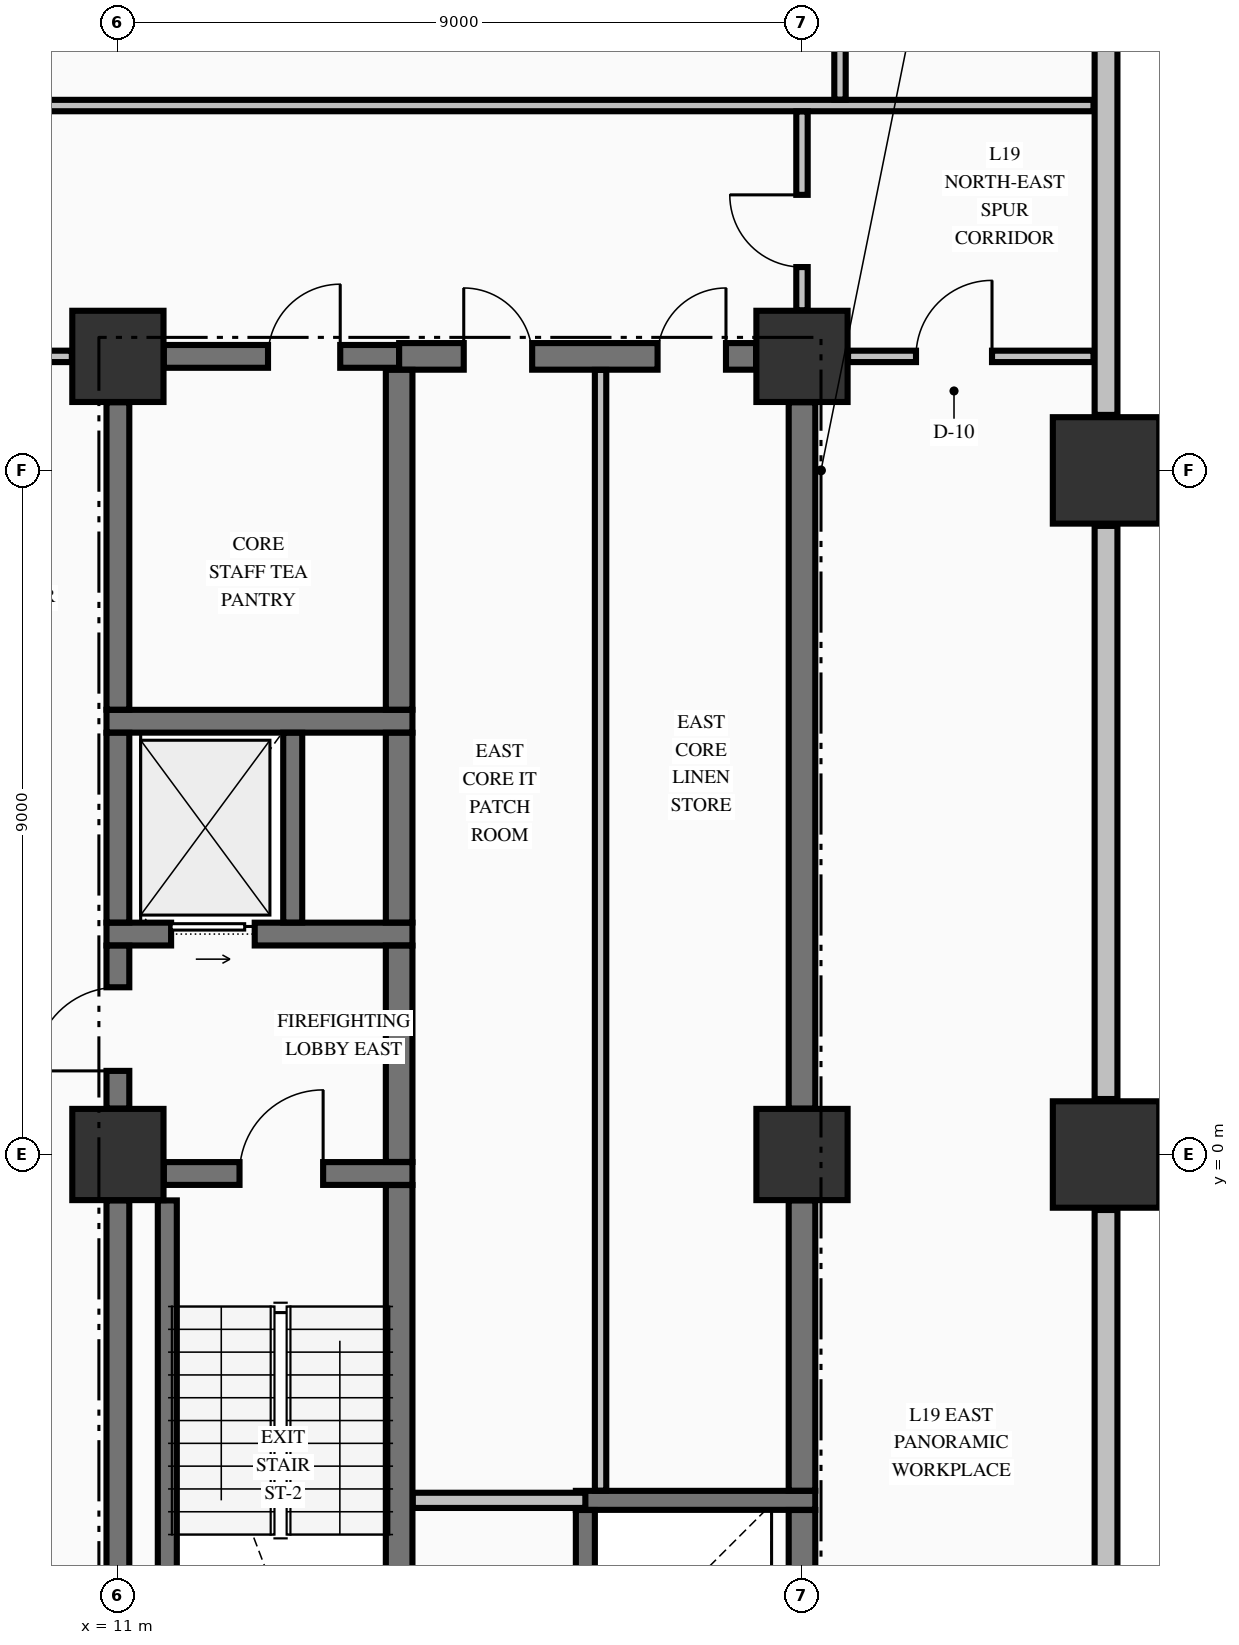
"""IFC4 building model, lengths in metres.
Left out: names, types, materials, properties, quantities, classifications, styles, units other than length and angle.
Written with IfcOpenShell. Run it as: python <this file> out.ifc"""

import sys

from ifc_helpers import new_model, si_unit, direction, frame, frame_2d, origin, origin_2d, place, context, subcontext, project, spatial, rectangle, extrude, element, fill, save


model = new_model("IFC4")
c1 = context("Model", 3, precision=1e-05, world=origin(), true_north=direction((0.0, 1.0)))
c2 = subcontext(c1, "Body", "Model", "MODEL_VIEW")
j1 = project(units=[si_unit("LENGTHUNIT", "METRE"), si_unit("PLANEANGLEUNIT", "RADIAN")], contexts=[c1])
p1 = place(None, origin())
s1 = spatial("IfcSite", under=j1, at=p1, CompositionType="ELEMENT")
p2 = place(p1, origin())
s2 = spatial("IfcBuilding", under=s1, at=p2, CompositionType="ELEMENT")
p3 = place(p2, frame((0.0, 0.0, 78.61)))
s3 = spatial("IfcBuildingStorey", under=s2, at=p3, CompositionType="ELEMENT", Elevation=78.61)
for number, where, z_axis, x_axis in (
    (1, (24.0, 0.0, -0.25), (0.0, 0.0, 1.0), (1.0, 0.0, 0.0)),
    (2, (24.0, 9.0, -0.25), (0.0, 0.0, 1.0), (1.0, 0.0, 0.0)),
):
    element("IfcColumn", number, at=place(p3, frame(where, z_axis=z_axis, x_axis=x_axis)), inside=s3, PredefinedType="COLUMN", context=c2, shape_type="SweptSolid", body=[
        extrude(rectangle(XDim=1.4, YDim=1.4, at=origin_2d()), origin(), (0.0, 0.0, 1.0), 3.395),
    ])
for number, where, z_axis, x_axis in (
    (3, (11.0, 0.0, -0.25), (0.0, 0.0, 1.0), (1.0, 0.0, 0.0)),
    (4, (11.0, 10.5, -0.25), (0.0, 0.0, 1.0), (1.0, 0.0, 0.0)),
    (5, (20.0, 10.5, -0.25), (0.0, 0.0, 1.0), (1.0, 0.0, 0.0)),
    (6, (20.0, 0.0, -0.25), (0.0, 0.0, 1.0), (1.0, 0.0, 0.0)),
):
    element("IfcColumn", number, at=place(p3, frame(where, z_axis=z_axis, x_axis=x_axis)), inside=s3, PredefinedType="COLUMN", context=c2, shape_type="SweptSolid", body=[
        extrude(rectangle(XDim=1.2, YDim=1.2, at=origin_2d()), origin(), (0.0, 0.0, 1.0), 3.395),
    ])
for number, where, z_axis, x_axis in (
    (7, (24.0, -8.27, 0.0), (0.0, 0.0, 1.0), (0.0, 1.0, 0.0)),
    (8, (24.0, 0.73, 0.0), (0.0, 0.0, 1.0), (0.0, 1.0, 0.0)),
):
    element("IfcWall", number, at=place(p3, frame(where, z_axis=z_axis, x_axis=x_axis)), inside=s3, PredefinedType="STANDARD", context=c2, shape_type="SweptSolid", body=[
        extrude(rectangle(XDim=7.54, YDim=0.3, at=frame_2d((3.77, 0.0))), origin(), (0.0, 0.0, 1.0), 2.537),
    ])
p4 = place(p3, frame((24.0, 9.73, 0.0), z_axis=(0.0, 0.0, 1.0), x_axis=(0.0, 1.0, 0.0)))
e9 = element("IfcWall", 9, at=p4, inside=s3, PredefinedType="STANDARD", context=c2, shape_type="SweptSolid", body=[
    extrude(rectangle(XDim=12.54, YDim=0.3, at=frame_2d((6.27, 0.0))), origin(), (0.0, 0.0, 1.0), 2.537),
])
p5 = place(p3, frame((17.025, -4.55, 0.0), z_axis=(0.0, 0.0, 1.0), x_axis=(1.0, 0.0, 0.0)))
e10 = element("IfcWall", 10, at=p5, inside=s3, PredefinedType="SOLIDWALL", context=c2, shape_type="SweptSolid", body=[
    extrude(rectangle(XDim=3.15, YDim=0.25, at=frame_2d((1.575, 0.0))), origin(), (0.0, 0.0, 1.0), 3.145),
])
p6 = place(p3, frame((11.604, -0.25, 0.0), z_axis=(0.0, 0.0, 1.0), x_axis=(1.0, 0.0, 0.0)))
e11 = element("IfcWall", 11, at=p6, inside=s3, PredefinedType="SHEAR", context=c2, shape_type="SweptSolid", body=[
    extrude(rectangle(XDim=3.271, YDim=0.3, at=frame_2d((1.635, 0.0))), origin(), (0.0, 0.0, 1.0), 3.145),
])
p7 = place(p6, frame((0.996, 0.0, 0.0)))
e12 = element("IfcOpeningElement", 12, at=p7, cuts=e11, PredefinedType="OPENING", context=c2, shape_type="SweptSolid", body=[
    extrude(rectangle(XDim=1.1, YDim=2.15, at=frame_2d((0.55, 1.075))), frame((0.0, 0.16, 0.0), z_axis=(0.0, -1.0, 0.0), x_axis=(1.0, 0.0, 0.0)), (0.0, 0.0, 1.0), 0.32),
])
p8 = place(p3, frame((10.85, 2.9, 0.0), z_axis=(0.0, 0.0, 1.0), x_axis=(1.0, 0.0, 0.0)))
e13 = element("IfcWall", 13, at=p8, inside=s3, PredefinedType="SHEAR", context=c2, shape_type="SweptSolid", body=[
    extrude(rectangle(XDim=4.025, YDim=0.3, at=frame_2d((2.012, 0.0))), origin(), (0.0, 0.0, 1.0), 3.145),
])
p9 = place(p8, frame((0.85, 0.0, 0.0)))
e14 = element("IfcOpeningElement", 14, at=p9, cuts=e13, PredefinedType="OPENING", context=c2, shape_type="SweptSolid", body=[
    extrude(rectangle(XDim=1.1, YDim=2.2, at=frame_2d((0.55, 1.1))), frame((0.0, 0.16, 0.0), z_axis=(0.0, -1.0, 0.0), x_axis=(1.0, 0.0, 0.0)), (0.0, 0.0, 1.0), 0.32),
])
p10 = place(p3, frame((10.85, 5.7, 0.0), z_axis=(0.0, 0.0, 1.0), x_axis=(1.0, 0.0, 0.0)))
e15 = element("IfcWall", 15, at=p10, inside=s3, PredefinedType="SHEAR", context=c2, shape_type="SweptSolid", body=[
    extrude(rectangle(XDim=4.025, YDim=0.3, at=frame_2d((2.012, 0.0))), origin(), (0.0, 0.0, 1.0), 3.145),
])
p11 = place(p3, frame((11.604, 10.5, 0.0), z_axis=(0.0, 0.0, 1.0), x_axis=(1.0, 0.0, 0.0)))
e16 = element("IfcWall", 16, at=p11, inside=s3, PredefinedType="SHEAR", context=c2, shape_type="SweptSolid", body=[
    extrude(rectangle(XDim=3.096, YDim=0.3, at=frame_2d((1.548, 0.0))), origin(), (0.0, 0.0, 1.0), 3.145),
])
p12 = place(p11, frame((1.371, 0.0, 0.0)))
e17 = element("IfcOpeningElement", 17, at=p12, cuts=e16, PredefinedType="OPENING", context=c2, shape_type="SweptSolid", body=[
    extrude(rectangle(XDim=0.95, YDim=2.15, at=frame_2d((0.475, 1.075))), frame((0.0, 0.16, 0.0), z_axis=(0.0, -1.0, 0.0), x_axis=(1.0, 0.0, 0.0)), (0.0, 0.0, 1.0), 0.32),
])
p13 = place(p3, frame((14.7, 10.5, 0.0), z_axis=(0.0, 0.0, 1.0), x_axis=(1.0, 0.0, 0.0)))
e18 = element("IfcWall", 18, at=p13, inside=s3, PredefinedType="SHEAR", context=c2, shape_type="SweptSolid", body=[
    extrude(rectangle(XDim=4.696, YDim=0.35, at=frame_2d((2.348, 0.0))), origin(), (0.0, 0.0, 1.0), 3.145),
])
p14 = place(p13, frame((0.85, 0.0, 0.0)))
e19 = element("IfcOpeningElement", 19, at=p14, cuts=e18, PredefinedType="OPENING", context=c2, shape_type="SweptSolid", body=[
    extrude(rectangle(XDim=0.9, YDim=2.15, at=frame_2d((0.45, 1.075))), frame((0.0, 0.185, 0.0), z_axis=(0.0, -1.0, 0.0), x_axis=(1.0, 0.0, 0.0)), (0.0, 0.0, 1.0), 0.37),
])
p15 = place(p13, frame((3.4, 0.0, 0.0)))
e20 = element("IfcOpeningElement", 20, at=p15, cuts=e18, PredefinedType="OPENING", context=c2, shape_type="SweptSolid", body=[
    extrude(rectangle(XDim=0.9, YDim=2.15, at=frame_2d((0.45, 1.075))), frame((0.0, 0.185, 0.0), z_axis=(0.0, -1.0, 0.0), x_axis=(1.0, 0.0, 0.0)), (0.0, 0.0, 1.0), 0.37),
])
p16 = place(p3, frame((14.878, -4.55, 0.0), z_axis=(0.0, 0.0, 1.0), x_axis=(1.0, 0.0, 0.0)))
e21 = element("IfcWall", 21, at=p16, inside=s3, PredefinedType="PARTITIONING", context=c2, shape_type="SweptSolid", body=[
    extrude(rectangle(XDim=2.272, YDim=0.2, at=frame_2d((1.136, 0.0))), origin(), (0.0, 0.0, 1.0), 3.145),
])
p17 = place(p3, frame((-10.394, 10.5, 0.0), z_axis=(0.0, 0.0, 1.0), x_axis=(1.0, 0.0, 0.0)))
e22 = element("IfcWall", 22, at=p17, inside=s3, PredefinedType="PARTITIONING", context=c2, shape_type="SweptSolid", body=[
    extrude(rectangle(XDim=20.788, YDim=0.15, at=frame_2d((10.394, 0.0))), origin(), (0.0, 0.0, 1.0), 3.145),
])
p18 = place(p17, frame((0.319, 0.0, 0.0)))
e23 = element("IfcOpeningElement", 23, at=p18, cuts=e22, PredefinedType="OPENING", context=c2, shape_type="SweptSolid", body=[
    extrude(rectangle(XDim=1.05, YDim=2.15, at=frame_2d((0.525, 1.075))), frame((0.0, 0.085, 0.0), z_axis=(0.0, -1.0, 0.0), x_axis=(1.0, 0.0, 0.0)), (0.0, 0.0, 1.0), 0.17),
])
p19 = place(p17, frame((19.419, 0.0, 0.0)))
e24 = element("IfcOpeningElement", 24, at=p19, cuts=e22, PredefinedType="OPENING", context=c2, shape_type="SweptSolid", body=[
    extrude(rectangle(XDim=1.05, YDim=2.15, at=frame_2d((0.525, 1.075))), frame((0.0, 0.085, 0.0), z_axis=(0.0, -1.0, 0.0), x_axis=(1.0, 0.0, 0.0)), (0.0, 0.0, 1.0), 0.17),
])
p20 = place(p3, frame((20.606, 10.5, 0.0), z_axis=(0.0, 0.0, 1.0), x_axis=(1.0, 0.0, 0.0)))
e25 = element("IfcWall", 25, at=p20, inside=s3, PredefinedType="PARTITIONING", context=c2, shape_type="SweptSolid", body=[
    extrude(rectangle(XDim=3.229, YDim=0.15, at=frame_2d((1.615, 0.0))), origin(), (0.0, 0.0, 1.0), 3.145),
])
p21 = place(p20, frame((0.894, 0.0, 0.0)))
e26 = element("IfcOpeningElement", 26, at=p21, cuts=e25, PredefinedType="OPENING", context=c2, shape_type="SweptSolid", body=[
    extrude(rectangle(XDim=1.0, YDim=2.15, at=frame_2d((0.5, 1.075))), frame((0.0, 0.085, 0.0), z_axis=(0.0, -1.0, 0.0), x_axis=(1.0, 0.0, 0.0)), (0.0, 0.0, 1.0), 0.17),
])
p22 = place(p3, frame((-28.835, 13.8, 0.0), z_axis=(0.0, 0.0, 1.0), x_axis=(1.0, 0.0, 0.0)))
e27 = element("IfcWall", 27, at=p22, inside=s3, PredefinedType="PARTITIONING", context=c2, shape_type="SweptSolid", body=[
    extrude(rectangle(XDim=52.67, YDim=0.15, at=frame_2d((26.335, 0.0))), origin(), (0.0, 0.0, 1.0), 3.145),
])
p23 = place(p22, frame((20.38, 0.0, 0.0)))
e28 = element("IfcOpeningElement", 28, at=p23, cuts=e27, PredefinedType="OPENING", context=c2, shape_type="SweptSolid", body=[
    extrude(rectangle(XDim=1.05, YDim=2.15, at=frame_2d((0.525, 1.075))), frame((0.0, 0.085, 0.0), z_axis=(0.0, -1.0, 0.0), x_axis=(1.0, 0.0, 0.0)), (0.0, 0.0, 1.0), 0.17),
])
p24 = place(p22, frame((33.91, 0.0, 0.0)))
e29 = element("IfcOpeningElement", 29, at=p24, cuts=e27, PredefinedType="OPENING", context=c2, shape_type="SweptSolid", body=[
    extrude(rectangle(XDim=1.05, YDim=2.15, at=frame_2d((0.525, 1.075))), frame((0.0, 0.085, 0.0), z_axis=(0.0, -1.0, 0.0), x_axis=(1.0, 0.0, 0.0)), (0.0, 0.0, 1.0), 0.17),
])
p25 = place(p3, frame((11.0, -9.346, 0.0), z_axis=(0.0, 0.0, 1.0), x_axis=(0.0, 1.0, 0.0)))
e30 = element("IfcWall", 30, at=p25, inside=s3, PredefinedType="SHEAR", context=c2, shape_type="SweptSolid", body=[
    extrude(rectangle(XDim=8.742, YDim=0.3, at=frame_2d((4.371, 0.0))), origin(), (0.0, 0.0, 1.0), 3.145),
])
p26 = place(p3, frame((11.0, 0.604, 0.0), z_axis=(0.0, 0.0, 1.0), x_axis=(0.0, 1.0, 0.0)))
e31 = element("IfcWall", 31, at=p26, inside=s3, PredefinedType="SHEAR", context=c2, shape_type="SweptSolid", body=[
    extrude(rectangle(XDim=2.144, YDim=0.3, at=frame_2d((1.072, 0.0))), origin(), (0.0, 0.0, 1.0), 3.145),
])
p27 = place(p26, frame((0.496, 0.0, 0.0)))
e32 = element("IfcOpeningElement", 32, at=p27, cuts=e31, PredefinedType="OPENING", context=c2, shape_type="SweptSolid", body=[
    extrude(rectangle(XDim=1.1, YDim=2.15, at=frame_2d((0.55, 1.075))), frame((0.0, 0.16, 0.0), z_axis=(0.0, -1.0, 0.0), x_axis=(1.0, 0.0, 0.0)), (0.0, 0.0, 1.0), 0.32),
])
p28 = place(p3, frame((11.0, 3.052, 0.0), z_axis=(0.0, 0.0, 1.0), x_axis=(0.0, 1.0, 0.0)))
e33 = element("IfcWall", 33, at=p28, inside=s3, PredefinedType="SHEAR", context=c2, shape_type="SweptSolid", body=[
    extrude(rectangle(XDim=2.496, YDim=0.3, at=frame_2d((1.248, 0.0))), origin(), (0.0, 0.0, 1.0), 3.145),
])
p29 = place(p3, frame((11.0, 5.852, 0.0), z_axis=(0.0, 0.0, 1.0), x_axis=(0.0, 1.0, 0.0)))
e34 = element("IfcWall", 34, at=p29, inside=s3, PredefinedType="SHEAR", context=c2, shape_type="SweptSolid", body=[
    extrude(rectangle(XDim=4.044, YDim=0.3, at=frame_2d((2.022, 0.0))), origin(), (0.0, 0.0, 1.0), 3.145),
])
p30 = place(p3, frame((11.65, -9.346, 0.0), z_axis=(0.0, 0.0, 1.0), x_axis=(0.0, 1.0, 0.0)))
e35 = element("IfcWall", 35, at=p30, inside=s3, PredefinedType="SOLIDWALL", context=c2, shape_type="SweptSolid", body=[
    extrude(rectangle(XDim=8.742, YDim=0.25, at=frame_2d((4.371, 0.0))), origin(), (0.0, 0.0, 1.0), 3.145),
])
p31 = place(p3, frame((13.3, 3.052, 0.0), z_axis=(0.0, 0.0, 1.0), x_axis=(0.0, 1.0, 0.0)))
e36 = element("IfcWall", 36, at=p31, inside=s3, PredefinedType="SOLIDWALL", context=c2, shape_type="SweptSolid", body=[
    extrude(rectangle(XDim=2.496, YDim=0.25, at=frame_2d((1.248, 0.0))), origin(), (0.0, 0.0, 1.0), 3.145),
])
p32 = place(p3, frame((14.7, -9.773, 0.0), z_axis=(0.0, 0.0, 1.0), x_axis=(0.0, 1.0, 0.0)))
e37 = element("IfcWall", 37, at=p32, inside=s3, PredefinedType="SHEAR", context=c2, shape_type="SweptSolid", body=[
    extrude(rectangle(XDim=9.371, YDim=0.35, at=frame_2d((4.686, 0.0))), origin(), (0.0, 0.0, 1.0), 3.145),
])
p33 = place(p3, frame((14.7, -0.098, 0.0), z_axis=(0.0, 0.0, 1.0), x_axis=(0.0, 1.0, 0.0)))
e38 = element("IfcWall", 38, at=p33, inside=s3, PredefinedType="SHEAR", context=c2, shape_type="SweptSolid", body=[
    extrude(rectangle(XDim=2.846, YDim=0.35, at=frame_2d((1.423, 0.0))), origin(), (0.0, 0.0, 1.0), 3.145),
])
p34 = place(p3, frame((14.7, 3.052, 0.0), z_axis=(0.0, 0.0, 1.0), x_axis=(0.0, 1.0, 0.0)))
e39 = element("IfcWall", 39, at=p34, inside=s3, PredefinedType="SHEAR", context=c2, shape_type="SweptSolid", body=[
    extrude(rectangle(XDim=2.496, YDim=0.35, at=frame_2d((1.248, 0.0))), origin(), (0.0, 0.0, 1.0), 3.145),
])
p35 = place(p3, frame((14.7, 5.852, 0.0), z_axis=(0.0, 0.0, 1.0), x_axis=(0.0, 1.0, 0.0)))
e40 = element("IfcWall", 40, at=p35, inside=s3, PredefinedType="SHEAR", context=c2, shape_type="SweptSolid", body=[
    extrude(rectangle(XDim=4.471, YDim=0.35, at=frame_2d((2.235, 0.0))), origin(), (0.0, 0.0, 1.0), 3.145),
])
p36 = place(p3, frame((17.15, -6.923, 0.0), z_axis=(0.0, 0.0, 1.0), x_axis=(0.0, 1.0, 0.0)))
e41 = element("IfcWall", 41, at=p36, inside=s3, PredefinedType="SOLIDWALL", context=c2, shape_type="SweptSolid", body=[
    extrude(rectangle(XDim=2.246, YDim=0.25, at=frame_2d((1.123, 0.0))), origin(), (0.0, 0.0, 1.0), 3.145),
])
p37 = place(p3, frame((20.0, -6.923, 0.0), z_axis=(0.0, 0.0, 1.0), x_axis=(0.0, 1.0, 0.0)))
e42 = element("IfcWall", 42, at=p37, inside=s3, PredefinedType="SHEAR", context=c2, shape_type="SweptSolid", body=[
    extrude(rectangle(XDim=2.246, YDim=0.35, at=frame_2d((1.123, 0.0))), origin(), (0.0, 0.0, 1.0), 3.145),
])
p38 = place(p3, frame((20.0, -4.423, 0.0), z_axis=(0.0, 0.0, 1.0), x_axis=(0.0, 1.0, 0.0)))
e43 = element("IfcWall", 43, at=p38, inside=s3, PredefinedType="SHEAR", context=c2, shape_type="SweptSolid", body=[
    extrude(rectangle(XDim=3.819, YDim=0.35, at=frame_2d((1.91, 0.0))), origin(), (0.0, 0.0, 1.0), 3.145),
])
p39 = place(p3, frame((20.0, 0.604, 0.0), z_axis=(0.0, 0.0, 1.0), x_axis=(0.0, 1.0, 0.0)))
e44 = element("IfcWall", 44, at=p39, inside=s3, PredefinedType="SHEAR", context=c2, shape_type="SweptSolid", body=[
    extrude(rectangle(XDim=9.292, YDim=0.35, at=frame_2d((4.646, 0.0))), origin(), (0.0, 0.0, 1.0), 3.145),
])
p40 = place(p3, frame((17.35, -4.422, 0.0), z_axis=(0.0, 0.0, 1.0), x_axis=(0.0, 1.0, 0.0)))
e45 = element("IfcWall", 45, at=p40, inside=s3, PredefinedType="PARTITIONING", context=c2, shape_type="SweptSolid", body=[
    extrude(rectangle(XDim=14.744, YDim=0.15, at=frame_2d((7.372, 0.0))), origin(), (0.0, 0.0, 1.0), 3.145),
])
p41 = place(p3, frame((20.0, 11.106, 0.0), z_axis=(0.0, 0.0, 1.0), x_axis=(0.0, 1.0, 0.0)))
e46 = element("IfcWall", 46, at=p41, inside=s3, PredefinedType="PARTITIONING", context=c2, shape_type="SweptSolid", body=[
    extrude(rectangle(XDim=2.616, YDim=0.15, at=frame_2d((1.308, 0.0))), origin(), (0.0, 0.0, 1.0), 3.145),
])
p42 = place(p41, frame((0.569, 0.0, 0.0)))
e47 = element("IfcOpeningElement", 47, at=p42, cuts=e46, PredefinedType="OPENING", context=c2, shape_type="SweptSolid", body=[
    extrude(rectangle(XDim=0.95, YDim=2.15, at=frame_2d((0.475, 1.075))), frame((0.0, 0.085, 0.0), z_axis=(0.0, -1.0, 0.0), x_axis=(1.0, 0.0, 0.0)), (0.0, 0.0, 1.0), 0.17),
])
p43 = place(p3, frame((20.5, 13.878, 0.0), z_axis=(0.0, 0.0, 1.0), x_axis=(0.0, 1.0, 0.0)))
e48 = element("IfcWall", 48, at=p43, inside=s3, PredefinedType="PARTITIONING", context=c2, shape_type="SweptSolid", body=[
    extrude(rectangle(XDim=8.416, YDim=0.15, at=frame_2d((4.208, 0.0))), origin(), (0.0, 0.0, 1.0), 3.145),
])
p44 = place(p7, origin())
e49 = element("IfcDoor", 49, at=p44, inside=s3, OperationType="SINGLE_SWING_RIGHT", PredefinedType="DOOR", context=c2, shape_type="SweptSolid", body=[
    extrude(rectangle(XDim=1.1, YDim=2.15, at=frame_2d((0.55, 1.075))), frame((0.0, 0.025, 0.0), z_axis=(0.0, -1.0, 0.0), x_axis=(1.0, 0.0, 0.0)), (0.0, 0.0, 1.0), 0.05),
])
fill(e12, e49)
p45 = place(p27, origin())
e50 = element("IfcDoor", 50, at=p45, inside=s3, OperationType="SINGLE_SWING_LEFT", PredefinedType="DOOR", context=c2, shape_type="SweptSolid", body=[
    extrude(rectangle(XDim=1.1, YDim=2.15, at=frame_2d((0.55, 1.075))), frame((0.0, 0.025, 0.0), z_axis=(0.0, -1.0, 0.0), x_axis=(1.0, 0.0, 0.0)), (0.0, 0.0, 1.0), 0.05),
])
fill(e32, e50)
p46 = place(p9, origin())
e51 = element("IfcDoor", 51, at=p46, inside=s3, OperationType="SLIDING_TO_RIGHT", PredefinedType="DOOR", context=c2, shape_type="SweptSolid", body=[
    extrude(rectangle(XDim=1.1, YDim=2.2, at=frame_2d((0.55, 1.1))), frame((0.0, 0.025, 0.0), z_axis=(0.0, -1.0, 0.0), x_axis=(1.0, 0.0, 0.0)), (0.0, 0.0, 1.0), 0.05),
])
fill(e14, e51)
p47 = place(p12, origin())
e52 = element("IfcDoor", 52, at=p47, inside=s3, OperationType="SINGLE_SWING_RIGHT", PredefinedType="DOOR", context=c2, shape_type="SweptSolid", body=[
    extrude(rectangle(XDim=0.95, YDim=2.15, at=frame_2d((0.475, 1.075))), frame((0.0, 0.025, 0.0), z_axis=(0.0, -1.0, 0.0), x_axis=(1.0, 0.0, 0.0)), (0.0, 0.0, 1.0), 0.05),
])
fill(e17, e52)
p48 = place(p14, origin())
e53 = element("IfcDoor", 53, at=p48, inside=s3, OperationType="SINGLE_SWING_LEFT", PredefinedType="DOOR", context=c2, shape_type="SweptSolid", body=[
    extrude(rectangle(XDim=0.9, YDim=2.15, at=frame_2d((0.45, 1.075))), frame((0.0, 0.025, 0.0), z_axis=(0.0, -1.0, 0.0), x_axis=(1.0, 0.0, 0.0)), (0.0, 0.0, 1.0), 0.05),
])
fill(e19, e53)
p49 = place(p15, origin())
e54 = element("IfcDoor", 54, at=p49, inside=s3, OperationType="SINGLE_SWING_RIGHT", PredefinedType="DOOR", context=c2, shape_type="SweptSolid", body=[
    extrude(rectangle(XDim=0.9, YDim=2.15, at=frame_2d((0.45, 1.075))), frame((0.0, 0.025, 0.0), z_axis=(0.0, -1.0, 0.0), x_axis=(1.0, 0.0, 0.0)), (0.0, 0.0, 1.0), 0.05),
])
fill(e20, e54)
p50 = place(p42, origin())
e55 = element("IfcDoor", 55, at=p50, inside=s3, OperationType="SINGLE_SWING_RIGHT", PredefinedType="DOOR", context=c2, shape_type="SweptSolid", body=[
    extrude(rectangle(XDim=0.95, YDim=2.15, at=frame_2d((0.475, 1.075))), frame((0.0, 0.025, 0.0), z_axis=(0.0, -1.0, 0.0), x_axis=(1.0, 0.0, 0.0)), (0.0, 0.0, 1.0), 0.05),
])
fill(e47, e55)
p51 = place(p21, origin())
e56 = element("IfcDoor", 56, at=p51, inside=s3, OperationType="SINGLE_SWING_RIGHT", PredefinedType="DOOR", context=c2, shape_type="SweptSolid", body=[
    extrude(rectangle(XDim=1.0, YDim=2.15, at=frame_2d((0.5, 1.075))), frame((0.0, 0.025, 0.0), z_axis=(0.0, -1.0, 0.0), x_axis=(1.0, 0.0, 0.0)), (0.0, 0.0, 1.0), 0.05),
])
fill(e26, e56)
save(model, sys.argv[1])
